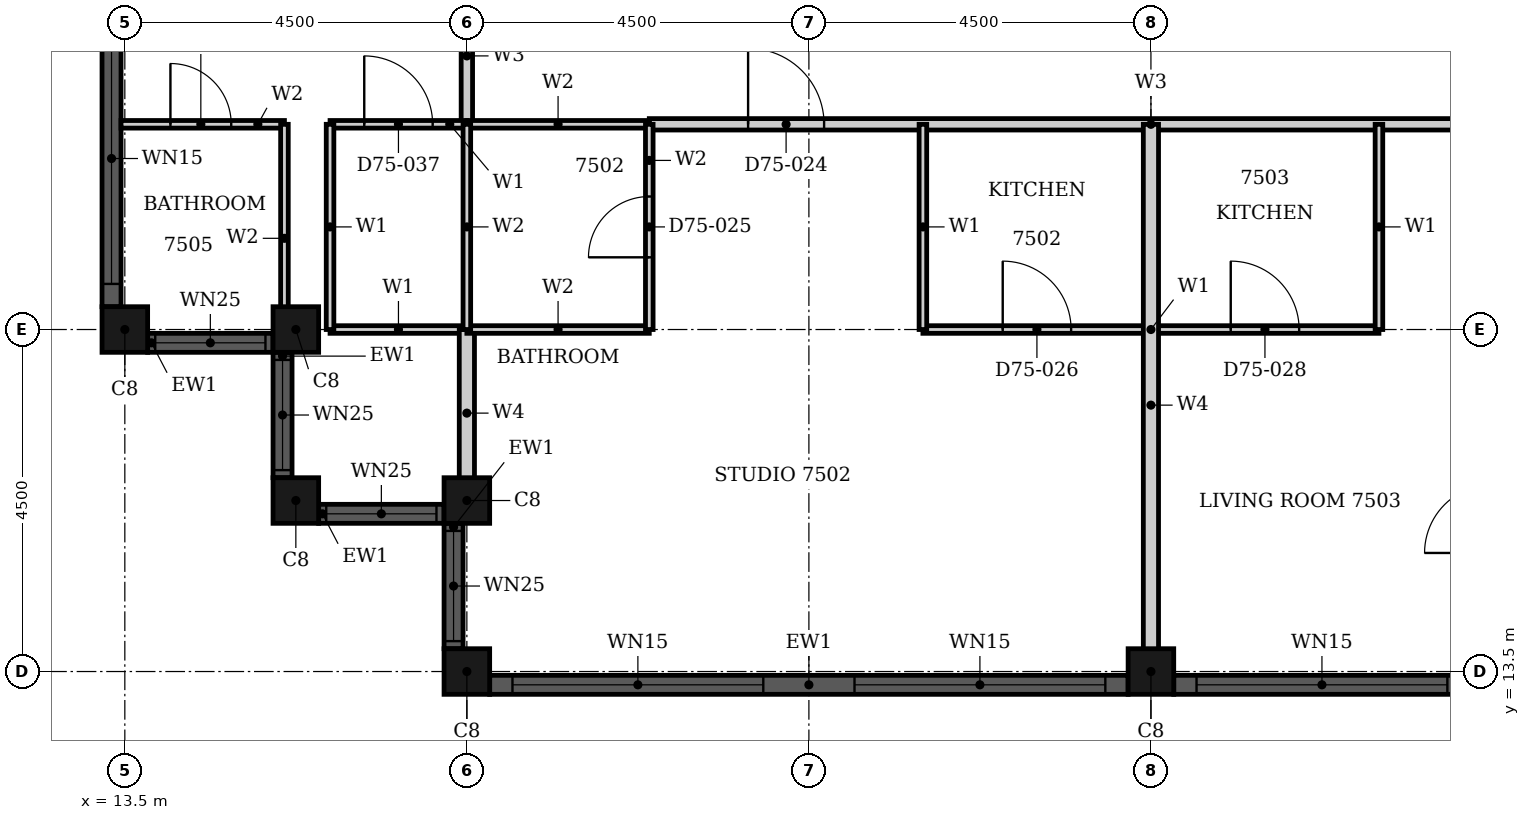
"""IFC4 building model, lengths in metres.
Left out: names, types, materials, properties, quantities, classifications, styles, units other than length and angle.
Written with IfcOpenShell. Run it as: python <this file> out.ifc"""

import sys

from ifc_helpers import new_model, si_unit, direction, frame, frame_2d, origin, origin_2d, place, context, subcontext, project, spatial, rectangle, hollow_rectangle, extrude, element, fill, save


model = new_model("IFC4")
c1 = context("Model", 3, precision=1e-05, world=origin(), true_north=direction((0.0, 1.0)))
c2 = subcontext(c1, "Body", "Model", "MODEL_VIEW")
j1 = project(units=[si_unit("LENGTHUNIT", "METRE"), si_unit("PLANEANGLEUNIT", "RADIAN")], contexts=[c1])
p1 = place(None, origin())
s1 = spatial("IfcSite", under=j1, at=p1, CompositionType="ELEMENT")
p2 = place(p1, origin())
s2 = spatial("IfcBuilding", under=s1, at=p2, CompositionType="ELEMENT")
p3 = place(p2, frame((0.0, 0.0, 294.5)))
s3 = spatial("IfcBuildingStorey", under=s2, at=p3, CompositionType="ELEMENT", Elevation=294.5)
for number, where, z_axis, x_axis in (
    (1, (13.5, 18.0, 0.0), (0.0, 0.0, 1.0), (1.0, 0.0, 0.0)),
    (2, (15.75, 18.0, 0.0), (0.0, 0.0, 1.0), (1.0, 0.0, 0.0)),
    (3, (15.75, 15.75, 0.0), (0.0, 0.0, 1.0), (1.0, 0.0, 0.0)),
    (4, (18.0, 15.75, 0.0), (0.0, 0.0, 1.0), (1.0, 0.0, 0.0)),
    (5, (18.0, 13.5, 0.0), (0.0, 0.0, 1.0), (1.0, 0.0, 0.0)),
    (6, (27.0, 13.5, 0.0), (0.0, 0.0, 1.0), (1.0, 0.0, 0.0)),
):
    element("IfcColumn", number, at=place(p3, frame(where, z_axis=z_axis, x_axis=x_axis)), inside=s3, PredefinedType="COLUMN", context=c2, shape_type="SweptSolid", body=[
        extrude(hollow_rectangle(XDim=0.6, YDim=0.6, WallThickness=0.02, at=origin_2d()), origin(), (0.0, 0.0, 1.0), 3.7),
    ])
p4 = place(p3, frame((13.325, 26.7, 0.0), z_axis=(0.0, 0.0, 1.0), x_axis=(0.0, -1.0, 0.0)))
e7 = element("IfcWall", 7, at=p4, inside=s3, PredefinedType="SOLIDWALL", context=c2, shape_type="SweptSolid", body=[
    extrude(rectangle(XDim=8.4, YDim=0.25, at=frame_2d((4.2, 0.0))), origin(), (0.0, 0.0, 1.0), 3.7),
])
p5 = place(p4, frame((0.3, 0.0, 0.45)))
e8 = element("IfcOpeningElement", 8, at=p5, cuts=e7, PredefinedType="OPENING", context=c2, shape_type="SweptSolid", body=[
    extrude(rectangle(XDim=3.3, YDim=2.3, at=frame_2d((1.65, 1.15))), frame((0.0, 0.135, 0.0), z_axis=(0.0, -1.0, 0.0), x_axis=(1.0, 0.0, 0.0)), (0.0, 0.0, 1.0), 0.27),
])
p6 = place(p4, frame((4.8, 0.0, 0.45)))
e9 = element("IfcOpeningElement", 9, at=p6, cuts=e7, PredefinedType="OPENING", context=c2, shape_type="SweptSolid", body=[
    extrude(rectangle(XDim=3.3, YDim=2.3, at=frame_2d((1.65, 1.15))), frame((0.0, 0.135, 0.0), z_axis=(0.0, -1.0, 0.0), x_axis=(1.0, 0.0, 0.0)), (0.0, 0.0, 1.0), 0.27),
])
p7 = place(p3, frame((13.8, 17.825, 0.0), z_axis=(0.0, 0.0, 1.0), x_axis=(1.0, 0.0, 0.0)))
e10 = element("IfcWall", 10, at=p7, inside=s3, PredefinedType="SOLIDWALL", context=c2, shape_type="SweptSolid", body=[
    extrude(rectangle(XDim=1.65, YDim=0.25, at=frame_2d((0.825, 0.0))), origin(), (0.0, 0.0, 1.0), 3.7),
])
p8 = place(p7, frame((0.1, 0.0, 0.9)))
e11 = element("IfcOpeningElement", 11, at=p8, cuts=e10, PredefinedType="OPENING", context=c2, shape_type="SweptSolid", body=[
    extrude(rectangle(XDim=1.45, YDim=1.85, at=frame_2d((0.725, 0.925))), frame((0.0, 0.135, 0.0), z_axis=(0.0, -1.0, 0.0), x_axis=(1.0, 0.0, 0.0)), (0.0, 0.0, 1.0), 0.27),
])
p9 = place(p3, frame((15.575, 17.7, 0.0), z_axis=(0.0, 0.0, 1.0), x_axis=(0.0, -1.0, 0.0)))
e12 = element("IfcWall", 12, at=p9, inside=s3, PredefinedType="SOLIDWALL", context=c2, shape_type="SweptSolid", body=[
    extrude(rectangle(XDim=1.65, YDim=0.25, at=frame_2d((0.825, 0.0))), origin(), (0.0, 0.0, 1.0), 3.7),
])
p10 = place(p9, frame((0.1, 0.0, 0.9)))
e13 = element("IfcOpeningElement", 13, at=p10, cuts=e12, PredefinedType="OPENING", context=c2, shape_type="SweptSolid", body=[
    extrude(rectangle(XDim=1.45, YDim=1.85, at=frame_2d((0.725, 0.925))), frame((0.0, 0.135, 0.0), z_axis=(0.0, -1.0, 0.0), x_axis=(1.0, 0.0, 0.0)), (0.0, 0.0, 1.0), 0.27),
])
p11 = place(p3, frame((16.05, 15.575, 0.0), z_axis=(0.0, 0.0, 1.0), x_axis=(1.0, 0.0, 0.0)))
e14 = element("IfcWall", 14, at=p11, inside=s3, PredefinedType="SOLIDWALL", context=c2, shape_type="SweptSolid", body=[
    extrude(rectangle(XDim=1.65, YDim=0.25, at=frame_2d((0.825, 0.0))), origin(), (0.0, 0.0, 1.0), 3.7),
])
p12 = place(p11, frame((0.1, 0.0, 0.9)))
e15 = element("IfcOpeningElement", 15, at=p12, cuts=e14, PredefinedType="OPENING", context=c2, shape_type="SweptSolid", body=[
    extrude(rectangle(XDim=1.45, YDim=1.85, at=frame_2d((0.725, 0.925))), frame((0.0, 0.135, 0.0), z_axis=(0.0, -1.0, 0.0), x_axis=(1.0, 0.0, 0.0)), (0.0, 0.0, 1.0), 0.27),
])
p13 = place(p3, frame((17.825, 15.45, 0.0), z_axis=(0.0, 0.0, 1.0), x_axis=(0.0, -1.0, 0.0)))
e16 = element("IfcWall", 16, at=p13, inside=s3, PredefinedType="SOLIDWALL", context=c2, shape_type="SweptSolid", body=[
    extrude(rectangle(XDim=1.65, YDim=0.25, at=frame_2d((0.825, 0.0))), origin(), (0.0, 0.0, 1.0), 3.7),
])
p14 = place(p13, frame((0.1, 0.0, 0.9)))
e17 = element("IfcOpeningElement", 17, at=p14, cuts=e16, PredefinedType="OPENING", context=c2, shape_type="SweptSolid", body=[
    extrude(rectangle(XDim=1.45, YDim=1.85, at=frame_2d((0.725, 0.925))), frame((0.0, 0.135, 0.0), z_axis=(0.0, -1.0, 0.0), x_axis=(1.0, 0.0, 0.0)), (0.0, 0.0, 1.0), 0.27),
])
p15 = place(p3, frame((18.3, 13.325, 0.0), z_axis=(0.0, 0.0, 1.0), x_axis=(1.0, 0.0, 0.0)))
e18 = element("IfcWall", 18, at=p15, inside=s3, PredefinedType="SOLIDWALL", context=c2, shape_type="SweptSolid", body=[
    extrude(rectangle(XDim=8.4, YDim=0.25, at=frame_2d((4.2, 0.0))), origin(), (0.0, 0.0, 1.0), 3.7),
])
p16 = place(p15, frame((0.3, 0.0, 0.45)))
e19 = element("IfcOpeningElement", 19, at=p16, cuts=e18, PredefinedType="OPENING", context=c2, shape_type="SweptSolid", body=[
    extrude(rectangle(XDim=3.3, YDim=2.3, at=frame_2d((1.65, 1.15))), frame((0.0, 0.135, 0.0), z_axis=(0.0, -1.0, 0.0), x_axis=(1.0, 0.0, 0.0)), (0.0, 0.0, 1.0), 0.27),
])
p17 = place(p15, frame((4.8, 0.0, 0.45)))
e20 = element("IfcOpeningElement", 20, at=p17, cuts=e18, PredefinedType="OPENING", context=c2, shape_type="SweptSolid", body=[
    extrude(rectangle(XDim=3.3, YDim=2.3, at=frame_2d((1.65, 1.15))), frame((0.0, 0.135, 0.0), z_axis=(0.0, -1.0, 0.0), x_axis=(1.0, 0.0, 0.0)), (0.0, 0.0, 1.0), 0.27),
])
p18 = place(p3, frame((27.3, 13.325, 0.0), z_axis=(0.0, 0.0, 1.0), x_axis=(1.0, 0.0, 0.0)))
e21 = element("IfcWall", 21, at=p18, inside=s3, PredefinedType="SOLIDWALL", context=c2, shape_type="SweptSolid", body=[
    extrude(rectangle(XDim=8.4, YDim=0.25, at=frame_2d((4.2, 0.0))), origin(), (0.0, 0.0, 1.0), 3.7),
])
p19 = place(p18, frame((0.3, 0.0, 0.45)))
e22 = element("IfcOpeningElement", 22, at=p19, cuts=e21, PredefinedType="OPENING", context=c2, shape_type="SweptSolid", body=[
    extrude(rectangle(XDim=3.3, YDim=2.3, at=frame_2d((1.65, 1.15))), frame((0.0, 0.135, 0.0), z_axis=(0.0, -1.0, 0.0), x_axis=(1.0, 0.0, 0.0)), (0.0, 0.0, 1.0), 0.27),
])
p20 = place(p18, frame((4.8, 0.0, 0.45)))
e23 = element("IfcOpeningElement", 23, at=p20, cuts=e21, PredefinedType="OPENING", context=c2, shape_type="SweptSolid", body=[
    extrude(rectangle(XDim=3.3, YDim=2.3, at=frame_2d((1.65, 1.15))), frame((0.0, 0.135, 0.0), z_axis=(0.0, -1.0, 0.0), x_axis=(1.0, 0.0, 0.0)), (0.0, 0.0, 1.0), 0.27),
])
p21 = place(p3, frame((20.4, 20.7, 0.0), z_axis=(0.0, 0.0, 1.0), x_axis=(1.0, 0.0, 0.0)))
e24 = element("IfcWall", 24, at=p21, inside=s3, PredefinedType="PARTITIONING", context=c2, shape_type="SweptSolid", body=[
    extrude(rectangle(XDim=13.2, YDim=0.15, at=frame_2d((6.6, 0.0))), origin(), (0.0, 0.0, 1.0), 3.4),
])
p22 = place(p21, frame((1.3, 0.0, 0.0)))
e25 = element("IfcOpeningElement", 25, at=p22, cuts=e24, PredefinedType="OPENING", context=c2, shape_type="SweptSolid", body=[
    extrude(rectangle(XDim=1.0, YDim=2.2, at=frame_2d((0.5, 1.1))), frame((0.0, 0.085, 0.0), z_axis=(0.0, -1.0, 0.0), x_axis=(1.0, 0.0, 0.0)), (0.0, 0.0, 1.0), 0.17),
])
p23 = place(p21, frame((10.9, 0.0, 0.0)))
e26 = element("IfcOpeningElement", 26, at=p23, cuts=e24, PredefinedType="OPENING", context=c2, shape_type="SweptSolid", body=[
    extrude(rectangle(XDim=1.0, YDim=2.2, at=frame_2d((0.5, 1.1))), frame((0.0, 0.085, 0.0), z_axis=(0.0, -1.0, 0.0), x_axis=(1.0, 0.0, 0.0)), (0.0, 0.0, 1.0), 0.17),
])
p24 = place(p3, frame((18.0, 20.7, 0.0), z_axis=(0.0, 0.0, 1.0), x_axis=(0.0, 1.0, 0.0)))
e27 = element("IfcWall", 27, at=p24, inside=s3, PredefinedType="PARTITIONING", context=c2, shape_type="SweptSolid", body=[
    extrude(rectangle(XDim=1.8, YDim=0.15, at=frame_2d((0.9, 0.0))), origin(), (0.0, 0.0, 1.0), 3.4),
])
p25 = place(p3, frame((24.0, 18.0, 0.0), z_axis=(0.0, 0.0, 1.0), x_axis=(1.0, 0.0, 0.0)))
e28 = element("IfcWall", 28, at=p25, inside=s3, PredefinedType="PARTITIONING", context=c2, shape_type="SweptSolid", body=[
    extrude(rectangle(XDim=6.0, YDim=0.1, at=frame_2d((3.0, 0.0))), origin(), (0.0, 0.0, 1.0), 3.4),
])
p26 = place(p25, frame((1.05, 0.0, 0.0)))
e29 = element("IfcOpeningElement", 29, at=p26, cuts=e28, PredefinedType="OPENING", context=c2, shape_type="SweptSolid", body=[
    extrude(rectangle(XDim=0.9, YDim=2.1, at=frame_2d((0.45, 1.05))), frame((0.0, 0.06, 0.0), z_axis=(0.0, -1.0, 0.0), x_axis=(1.0, 0.0, 0.0)), (0.0, 0.0, 1.0), 0.12),
])
p27 = place(p25, frame((4.05, 0.0, 0.0)))
e30 = element("IfcOpeningElement", 30, at=p27, cuts=e28, PredefinedType="OPENING", context=c2, shape_type="SweptSolid", body=[
    extrude(rectangle(XDim=0.9, YDim=2.1, at=frame_2d((0.45, 1.05))), frame((0.0, 0.06, 0.0), z_axis=(0.0, -1.0, 0.0), x_axis=(1.0, 0.0, 0.0)), (0.0, 0.0, 1.0), 0.12),
])
p28 = place(p3, frame((16.2, 18.0, 0.0), z_axis=(0.0, 0.0, 1.0), x_axis=(1.0, 0.0, 0.0)))
e31 = element("IfcWall", 31, at=p28, inside=s3, PredefinedType="PARTITIONING", context=c2, shape_type="SweptSolid", body=[
    extrude(rectangle(XDim=1.8, YDim=0.1, at=frame_2d((0.9, 0.0))), origin(), (0.0, 0.0, 1.0), 3.4),
])
p29 = place(p3, frame((16.2, 20.7, 0.0), z_axis=(0.0, 0.0, 1.0), x_axis=(1.0, 0.0, 0.0)))
e32 = element("IfcWall", 32, at=p29, inside=s3, PredefinedType="PARTITIONING", context=c2, shape_type="SweptSolid", body=[
    extrude(rectangle(XDim=1.8, YDim=0.1, at=frame_2d((0.9, 0.0))), origin(), (0.0, 0.0, 1.0), 3.4),
])
p30 = place(p29, frame((0.45, 0.0, 0.0)))
e33 = element("IfcOpeningElement", 33, at=p30, cuts=e32, PredefinedType="OPENING", context=c2, shape_type="SweptSolid", body=[
    extrude(rectangle(XDim=0.9, YDim=2.1, at=frame_2d((0.45, 1.05))), frame((0.0, 0.06, 0.0), z_axis=(0.0, -1.0, 0.0), x_axis=(1.0, 0.0, 0.0)), (0.0, 0.0, 1.0), 0.12),
])
for number, where, z_axis, x_axis in (
    (34, (16.2, 18.0, 0.0), (0.0, 0.0, 1.0), (0.0, 1.0, 0.0)),
    (35, (24.0, 18.0, 0.0), (0.0, 0.0, 1.0), (0.0, 1.0, 0.0)),
    (36, (30.0, 18.0, 0.0), (0.0, 0.0, 1.0), (0.0, 1.0, 0.0)),
):
    element("IfcWall", number, at=place(p3, frame(where, z_axis=z_axis, x_axis=x_axis)), inside=s3, PredefinedType="PARTITIONING", context=c2, shape_type="SweptSolid", body=[
        extrude(rectangle(XDim=2.7, YDim=0.1, at=frame_2d((1.35, 0.0))), origin(), (0.0, 0.0, 1.0), 3.4),
    ])
p31 = place(p3, frame((18.0, 15.8, 0.0), z_axis=(0.0, 0.0, 1.0), x_axis=(0.0, 1.0, 0.0)))
e37 = element("IfcWall", 37, at=p31, inside=s3, PredefinedType="PARTITIONING", context=c2, shape_type="SweptSolid", body=[
    extrude(rectangle(XDim=2.2, YDim=0.2, at=frame_2d((1.1, 0.0))), origin(), (0.0, 0.0, 1.0), 3.4),
])
p32 = place(p3, frame((27.0, 13.31, 0.0), z_axis=(0.0, 0.0, 1.0), x_axis=(0.0, 1.0, 0.0)))
e38 = element("IfcWall", 38, at=p32, inside=s3, PredefinedType="PARTITIONING", context=c2, shape_type="SweptSolid", body=[
    extrude(rectangle(XDim=7.39, YDim=0.2, at=frame_2d((3.695, 0.0))), origin(), (0.0, 0.0, 1.0), 3.4),
])
for number, where, z_axis, x_axis in (
    (39, (18.0, 18.0, 0.0), (0.0, 0.0, 1.0), (1.0, 0.0, 0.0)),
    (40, (18.0, 20.7, 0.0), (0.0, 0.0, 1.0), (1.0, 0.0, 0.0)),
):
    element("IfcWall", number, at=place(p3, frame(where, z_axis=z_axis, x_axis=x_axis)), inside=s3, PredefinedType="PARTITIONING", context=c2, shape_type="SweptSolid", body=[
        extrude(rectangle(XDim=2.4, YDim=0.1, at=frame_2d((1.2, 0.0))), origin(), (0.0, 0.0, 1.0), 3.4),
    ])
p33 = place(p3, frame((13.45, 20.7, 0.0), z_axis=(0.0, 0.0, 1.0), x_axis=(1.0, 0.0, 0.0)))
e41 = element("IfcWall", 41, at=p33, inside=s3, PredefinedType="PARTITIONING", context=c2, shape_type="SweptSolid", body=[
    extrude(rectangle(XDim=2.15, YDim=0.1, at=frame_2d((1.075, 0.0))), origin(), (0.0, 0.0, 1.0), 3.4),
])
p34 = place(p33, frame((0.65, 0.0, 0.0)))
e42 = element("IfcOpeningElement", 42, at=p34, cuts=e41, PredefinedType="OPENING", context=c2, shape_type="SweptSolid", body=[
    extrude(rectangle(XDim=0.8, YDim=2.1, at=frame_2d((0.4, 1.05))), frame((0.0, 0.06, 0.0), z_axis=(0.0, -1.0, 0.0), x_axis=(1.0, 0.0, 0.0)), (0.0, 0.0, 1.0), 0.12),
])
p35 = place(p3, frame((15.6, 17.7, 0.0), z_axis=(0.0, 0.0, 1.0), x_axis=(0.0, 1.0, 0.0)))
e43 = element("IfcWall", 43, at=p35, inside=s3, PredefinedType="PARTITIONING", context=c2, shape_type="SweptSolid", body=[
    extrude(rectangle(XDim=3.0, YDim=0.1, at=frame_2d((1.5, 0.0))), origin(), (0.0, 0.0, 1.0), 3.4),
])
p36 = place(p3, frame((18.0, 18.0, 0.0), z_axis=(0.0, 0.0, 1.0), x_axis=(0.0, 1.0, 0.0)))
e44 = element("IfcWall", 44, at=p36, inside=s3, PredefinedType="PARTITIONING", context=c2, shape_type="SweptSolid", body=[
    extrude(rectangle(XDim=2.7, YDim=0.1, at=frame_2d((1.35, 0.0))), origin(), (0.0, 0.0, 1.0), 3.4),
])
p37 = place(p3, frame((20.4, 18.0, 0.0), z_axis=(0.0, 0.0, 1.0), x_axis=(0.0, 1.0, 0.0)))
e45 = element("IfcWall", 45, at=p37, inside=s3, PredefinedType="PARTITIONING", context=c2, shape_type="SweptSolid", body=[
    extrude(rectangle(XDim=2.7, YDim=0.1, at=frame_2d((1.35, 0.0))), origin(), (0.0, 0.0, 1.0), 3.4),
])
p38 = place(p37, frame((0.95, 0.0, 0.0)))
e46 = element("IfcOpeningElement", 46, at=p38, cuts=e45, PredefinedType="OPENING", context=c2, shape_type="SweptSolid", body=[
    extrude(rectangle(XDim=0.8, YDim=2.1, at=frame_2d((0.4, 1.05))), frame((0.0, 0.06, 0.0), z_axis=(0.0, -1.0, 0.0), x_axis=(1.0, 0.0, 0.0)), (0.0, 0.0, 1.0), 0.12),
])
p39 = place(p6, origin())
e47 = element("IfcWindow", 47, at=p39, inside=s3, PartitioningType="SINGLE_PANEL", PredefinedType="WINDOW", context=c2, shape_type="SweptSolid", body=[
    extrude(rectangle(XDim=3.3, YDim=2.3, at=frame_2d((1.65, 1.15))), frame((0.0, 0.03, 0.0), z_axis=(0.0, -1.0, 0.0), x_axis=(1.0, 0.0, 0.0)), (0.0, 0.0, 1.0), 0.06),
])
fill(e9, e47)
p40 = place(p8, origin())
e48 = element("IfcWindow", 48, at=p40, inside=s3, PartitioningType="SINGLE_PANEL", PredefinedType="WINDOW", context=c2, shape_type="SweptSolid", body=[
    extrude(rectangle(XDim=1.45, YDim=1.85, at=frame_2d((0.725, 0.925))), frame((0.0, 0.03, 0.0), z_axis=(0.0, -1.0, 0.0), x_axis=(1.0, 0.0, 0.0)), (0.0, 0.0, 1.0), 0.06),
])
fill(e11, e48)
p41 = place(p10, origin())
e49 = element("IfcWindow", 49, at=p41, inside=s3, PartitioningType="SINGLE_PANEL", PredefinedType="WINDOW", context=c2, shape_type="SweptSolid", body=[
    extrude(rectangle(XDim=1.45, YDim=1.85, at=frame_2d((0.725, 0.925))), frame((0.0, 0.03, 0.0), z_axis=(0.0, -1.0, 0.0), x_axis=(1.0, 0.0, 0.0)), (0.0, 0.0, 1.0), 0.06),
])
fill(e13, e49)
p42 = place(p12, origin())
e50 = element("IfcWindow", 50, at=p42, inside=s3, PartitioningType="SINGLE_PANEL", PredefinedType="WINDOW", context=c2, shape_type="SweptSolid", body=[
    extrude(rectangle(XDim=1.45, YDim=1.85, at=frame_2d((0.725, 0.925))), frame((0.0, 0.03, 0.0), z_axis=(0.0, -1.0, 0.0), x_axis=(1.0, 0.0, 0.0)), (0.0, 0.0, 1.0), 0.06),
])
fill(e15, e50)
p43 = place(p14, origin())
e51 = element("IfcWindow", 51, at=p43, inside=s3, PartitioningType="SINGLE_PANEL", PredefinedType="WINDOW", context=c2, shape_type="SweptSolid", body=[
    extrude(rectangle(XDim=1.45, YDim=1.85, at=frame_2d((0.725, 0.925))), frame((0.0, 0.03, 0.0), z_axis=(0.0, -1.0, 0.0), x_axis=(1.0, 0.0, 0.0)), (0.0, 0.0, 1.0), 0.06),
])
fill(e17, e51)
p44 = place(p16, origin())
e52 = element("IfcWindow", 52, at=p44, inside=s3, PartitioningType="SINGLE_PANEL", PredefinedType="WINDOW", context=c2, shape_type="SweptSolid", body=[
    extrude(rectangle(XDim=3.3, YDim=2.3, at=frame_2d((1.65, 1.15))), frame((0.0, 0.03, 0.0), z_axis=(0.0, -1.0, 0.0), x_axis=(1.0, 0.0, 0.0)), (0.0, 0.0, 1.0), 0.06),
])
fill(e19, e52)
p45 = place(p17, origin())
e53 = element("IfcWindow", 53, at=p45, inside=s3, PartitioningType="SINGLE_PANEL", PredefinedType="WINDOW", context=c2, shape_type="SweptSolid", body=[
    extrude(rectangle(XDim=3.3, YDim=2.3, at=frame_2d((1.65, 1.15))), frame((0.0, 0.03, 0.0), z_axis=(0.0, -1.0, 0.0), x_axis=(1.0, 0.0, 0.0)), (0.0, 0.0, 1.0), 0.06),
])
fill(e20, e53)
p46 = place(p19, origin())
e54 = element("IfcWindow", 54, at=p46, inside=s3, PartitioningType="SINGLE_PANEL", PredefinedType="WINDOW", context=c2, shape_type="SweptSolid", body=[
    extrude(rectangle(XDim=3.3, YDim=2.3, at=frame_2d((1.65, 1.15))), frame((0.0, 0.03, 0.0), z_axis=(0.0, -1.0, 0.0), x_axis=(1.0, 0.0, 0.0)), (0.0, 0.0, 1.0), 0.06),
])
fill(e22, e54)
p47 = place(p22, origin())
e55 = element("IfcDoor", 55, at=p47, inside=s3, OperationType="SINGLE_SWING_RIGHT", PredefinedType="DOOR", context=c2, shape_type="SweptSolid", body=[
    extrude(rectangle(XDim=1.0, YDim=2.2, at=frame_2d((0.5, 1.1))), frame((0.0, 0.025, 0.0), z_axis=(0.0, -1.0, 0.0), x_axis=(1.0, 0.0, 0.0)), (0.0, 0.0, 1.0), 0.05),
])
fill(e25, e55)
p48 = place(p38, origin())
e56 = element("IfcDoor", 56, at=p48, inside=s3, OperationType="SINGLE_SWING_LEFT", PredefinedType="DOOR", context=c2, shape_type="SweptSolid", body=[
    extrude(rectangle(XDim=0.8, YDim=2.1, at=frame_2d((0.4, 1.05))), frame((0.0, 0.025, 0.0), z_axis=(0.0, -1.0, 0.0), x_axis=(1.0, 0.0, 0.0)), (0.0, 0.0, 1.0), 0.05),
])
fill(e46, e56)
p49 = place(p26, origin())
e57 = element("IfcDoor", 57, at=p49, inside=s3, OperationType="SINGLE_SWING_RIGHT", PredefinedType="DOOR", context=c2, shape_type="SweptSolid", body=[
    extrude(rectangle(XDim=0.9, YDim=2.1, at=frame_2d((0.45, 1.05))), frame((0.0, 0.025, 0.0), z_axis=(0.0, -1.0, 0.0), x_axis=(1.0, 0.0, 0.0)), (0.0, 0.0, 1.0), 0.05),
])
fill(e29, e57)
p50 = place(p27, origin())
e58 = element("IfcDoor", 58, at=p50, inside=s3, OperationType="SINGLE_SWING_RIGHT", PredefinedType="DOOR", context=c2, shape_type="SweptSolid", body=[
    extrude(rectangle(XDim=0.9, YDim=2.1, at=frame_2d((0.45, 1.05))), frame((0.0, 0.025, 0.0), z_axis=(0.0, -1.0, 0.0), x_axis=(1.0, 0.0, 0.0)), (0.0, 0.0, 1.0), 0.05),
])
fill(e30, e58)
p51 = place(p34, origin())
e59 = element("IfcDoor", 59, at=p51, inside=s3, OperationType="SINGLE_SWING_LEFT", PredefinedType="DOOR", context=c2, shape_type="SweptSolid", body=[
    extrude(rectangle(XDim=0.8, YDim=2.1, at=frame_2d((0.4, 1.05))), frame((0.0, 0.025, 0.0), z_axis=(0.0, -1.0, 0.0), x_axis=(1.0, 0.0, 0.0)), (0.0, 0.0, 1.0), 0.05),
])
fill(e42, e59)
p52 = place(p30, origin())
e60 = element("IfcDoor", 60, at=p52, inside=s3, OperationType="SINGLE_SWING_LEFT", PredefinedType="DOOR", context=c2, shape_type="SweptSolid", body=[
    extrude(rectangle(XDim=0.9, YDim=2.1, at=frame_2d((0.45, 1.05))), frame((0.0, 0.025, 0.0), z_axis=(0.0, -1.0, 0.0), x_axis=(1.0, 0.0, 0.0)), (0.0, 0.0, 1.0), 0.05),
])
fill(e33, e60)
save(model, sys.argv[1])
